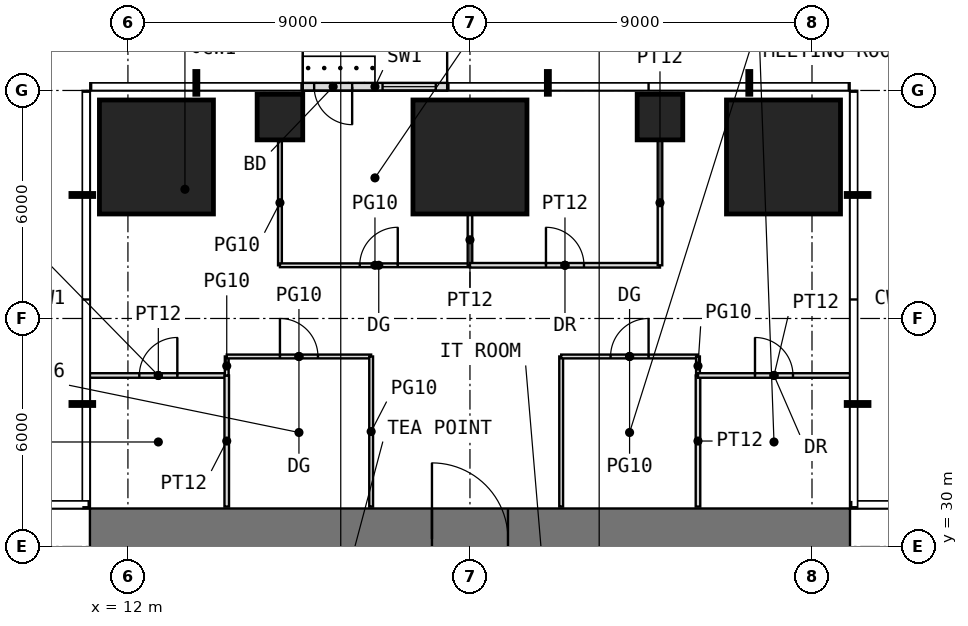
"""IFC4 building model, lengths in metres.
Left out: names, types, materials, properties, quantities, classifications, styles, units other than length and angle.
Written with IfcOpenShell. Run it as: python <this file> out.ifc"""

import sys

from ifc_helpers import new_model, si_unit, direction, frame, frame_2d, origin, origin_2d, place, context, subcontext, project, spatial, rectangle, extrude, element, fill, save


model = new_model("IFC4")
c1 = context("Model", 3, precision=1e-05, world=origin(), true_north=direction((0.0, 1.0)))
c2 = subcontext(c1, "Body", "Model", "MODEL_VIEW")
j1 = project(units=[si_unit("LENGTHUNIT", "METRE"), si_unit("PLANEANGLEUNIT", "RADIAN")], contexts=[c1])
p1 = place(None, origin())
s1 = spatial("IfcSite", under=j1, at=p1, CompositionType="ELEMENT")
p2 = place(p1, origin())
s2 = spatial("IfcBuilding", under=s1, at=p2, CompositionType="ELEMENT")
p3 = place(p2, frame((0.0, 0.0, 108.5)))
s3 = spatial("IfcBuildingStorey", under=s2, at=p3, CompositionType="ELEMENT", Elevation=108.5)
p4 = place(p3, frame((12.75, 40.25, 0.0), z_axis=(0.0, 0.0, 1.0), x_axis=(1.0, 0.0, 0.0)))
e1 = element("IfcColumn", 1, at=p4, inside=s3, PredefinedType="COLUMN", context=c2, shape_type="SweptSolid", body=[
    extrude(rectangle(XDim=3.0, YDim=3.0, at=origin_2d()), origin(), (0.0, 0.0, 1.0), 4.0),
])
p5 = place(p3, frame((16.0, 41.3, 0.0), z_axis=(0.0, 0.0, 1.0), x_axis=(1.0, 0.0, 0.0)))
e2 = element("IfcColumn", 2, at=p5, inside=s3, PredefinedType="COLUMN", context=c2, shape_type="SweptSolid", body=[
    extrude(rectangle(XDim=1.2, YDim=1.2, at=origin_2d()), origin(), (0.0, 0.0, 1.0), 4.0),
])
p6 = place(p3, frame((21.0, 40.25, 0.0), z_axis=(0.0, 0.0, 1.0), x_axis=(1.0, 0.0, 0.0)))
e3 = element("IfcColumn", 3, at=p6, inside=s3, PredefinedType="COLUMN", context=c2, shape_type="SweptSolid", body=[
    extrude(rectangle(XDim=3.0, YDim=3.0, at=origin_2d()), origin(), (0.0, 0.0, 1.0), 4.0),
])
p7 = place(p3, frame((26.0, 41.3, 0.0), z_axis=(0.0, 0.0, 1.0), x_axis=(1.0, 0.0, 0.0)))
e4 = element("IfcColumn", 4, at=p7, inside=s3, PredefinedType="COLUMN", context=c2, shape_type="SweptSolid", body=[
    extrude(rectangle(XDim=1.2, YDim=1.2, at=origin_2d()), origin(), (0.0, 0.0, 1.0), 4.0),
])
p8 = place(p3, frame((29.25, 40.25, 0.0), z_axis=(0.0, 0.0, 1.0), x_axis=(1.0, 0.0, 0.0)))
e5 = element("IfcColumn", 5, at=p8, inside=s3, PredefinedType="COLUMN", context=c2, shape_type="SweptSolid", body=[
    extrude(rectangle(XDim=3.0, YDim=3.0, at=origin_2d()), origin(), (0.0, 0.0, 1.0), 4.0),
])
p9 = place(p3, frame((20.4, 42.1, 0.0), z_axis=(0.0, 0.0, 1.0), x_axis=(-1.0, 0.0, 0.0)))
e6 = element("IfcWall", 6, at=p9, inside=s3, PredefinedType="USERDEFINED", context=c2, shape_type="SweptSolid", body=[
    extrude(rectangle(XDim=3.8, YDim=0.2, at=frame_2d((1.9, 0.0))), origin(), (0.0, 0.0, 1.0), 3.75),
])
p10 = place(p9, frame((2.5, 0.0, 0.0)))
e7 = element("IfcOpeningElement", 7, at=p10, cuts=e6, PredefinedType="OPENING", context=c2, shape_type="SweptSolid", body=[
    extrude(rectangle(XDim=1.0, YDim=2.4, at=frame_2d((0.5, 1.2))), frame((0.0, 0.11, 0.0), z_axis=(0.0, -1.0, 0.0), x_axis=(1.0, 0.0, 0.0)), (0.0, 0.0, 1.0), 0.22),
])
p11 = place(p9, frame((0.3, 0.0, 0.3)))
e8 = element("IfcOpeningElement", 8, at=p11, cuts=e6, PredefinedType="OPENING", context=c2, shape_type="SweptSolid", body=[
    extrude(rectangle(XDim=1.4, YDim=2.7, at=frame_2d((0.7, 1.35))), frame((0.0, 0.11, 0.0), z_axis=(0.0, -1.0, 0.0), x_axis=(1.0, 0.0, 0.0)), (0.0, 0.0, 1.0), 0.22),
])
p12 = place(p3, frame((11.0, 30.2, -0.05), z_axis=(0.0, 0.0, 1.0), x_axis=(1.0, 0.0, 0.0)))
e9 = element("IfcWall", 9, at=p12, inside=s3, PredefinedType="SHEAR", context=c2, shape_type="SweptSolid", body=[
    extrude(rectangle(XDim=20.0, YDim=1.6, at=frame_2d((10.0, 0.0))), origin(), (0.0, 0.0, 1.0), 4.0),
])
p13 = place(p12, frame((9.0, 0.0, 0.05)))
e10 = element("IfcOpeningElement", 10, at=p13, cuts=e9, PredefinedType="OPENING", context=c2, shape_type="SweptSolid", body=[
    extrude(rectangle(XDim=2.0, YDim=2.2, at=frame_2d((1.0, 1.1))), frame((0.0, 0.81, 0.0), z_axis=(0.0, -1.0, 0.0), x_axis=(1.0, 0.0, 0.0)), (0.0, 0.0, 1.0), 1.62),
])
p14 = place(p3, frame((11.0, 34.5, 0.0), z_axis=(0.0, 0.0, 1.0), x_axis=(1.0, 0.0, 0.0)))
e11 = element("IfcWall", 11, at=p14, inside=s3, PredefinedType="PARTITIONING", context=c2, shape_type="SweptSolid", body=[
    extrude(rectangle(XDim=3.6, YDim=0.12, at=frame_2d((1.8, 0.0))), origin(), (0.0, 0.0, 1.0), 3.75),
])
p15 = place(p14, frame((1.3, 0.0, 0.0)))
e12 = element("IfcOpeningElement", 12, at=p15, cuts=e11, PredefinedType="OPENING", context=c2, shape_type="SweptSolid", body=[
    extrude(rectangle(XDim=1.0, YDim=2.2, at=frame_2d((0.5, 1.1))), frame((0.0, 0.07, 0.0), z_axis=(0.0, -1.0, 0.0), x_axis=(1.0, 0.0, 0.0)), (0.0, 0.0, 1.0), 0.14),
])
p16 = place(p3, frame((14.6, 31.05, 0.0), z_axis=(0.0, 0.0, 1.0), x_axis=(0.0, 1.0, 0.0)))
e13 = element("IfcWall", 13, at=p16, inside=s3, PredefinedType="PARTITIONING", context=c2, shape_type="SweptSolid", body=[
    extrude(rectangle(XDim=3.45, YDim=0.12, at=frame_2d((1.725, 0.0))), origin(), (0.0, 0.0, 1.0), 3.75),
])
p17 = place(p3, frame((14.6, 34.5, 0.0), z_axis=(0.0, 0.0, 1.0), x_axis=(0.0, 1.0, 0.0)))
e14 = element("IfcWall", 14, at=p17, inside=s3, PredefinedType="PARTITIONING", context=c2, shape_type="SweptSolid", body=[
    extrude(rectangle(XDim=0.5, YDim=0.1, at=frame_2d((0.25, 0.0))), origin(), (0.0, 0.0, 1.0), 3.75),
])
p18 = place(p3, frame((14.6, 35.0, 0.0), z_axis=(0.0, 0.0, 1.0), x_axis=(1.0, 0.0, 0.0)))
e15 = element("IfcWall", 15, at=p18, inside=s3, PredefinedType="PARTITIONING", context=c2, shape_type="SweptSolid", body=[
    extrude(rectangle(XDim=3.8, YDim=0.1, at=frame_2d((1.9, 0.0))), origin(), (0.0, 0.0, 1.0), 3.75),
])
p19 = place(p18, frame((1.4, 0.0, 0.0)))
e16 = element("IfcOpeningElement", 16, at=p19, cuts=e15, PredefinedType="OPENING", context=c2, shape_type="SweptSolid", body=[
    extrude(rectangle(XDim=1.0, YDim=2.4, at=frame_2d((0.5, 1.2))), frame((0.0, 0.06, 0.0), z_axis=(0.0, -1.0, 0.0), x_axis=(1.0, 0.0, 0.0)), (0.0, 0.0, 1.0), 0.12),
])
p20 = place(p3, frame((16.0, 37.4, 0.0), z_axis=(0.0, 0.0, 1.0), x_axis=(0.0, 1.0, 0.0)))
e17 = element("IfcWall", 17, at=p20, inside=s3, PredefinedType="PARTITIONING", context=c2, shape_type="SweptSolid", body=[
    extrude(rectangle(XDim=3.29, YDim=0.1, at=frame_2d((1.645, 0.0))), origin(), (0.0, 0.0, 1.0), 3.75),
])
p21 = place(p3, frame((16.0, 37.4, 0.0), z_axis=(0.0, 0.0, 1.0), x_axis=(1.0, 0.0, 0.0)))
e18 = element("IfcWall", 18, at=p21, inside=s3, PredefinedType="PARTITIONING", context=c2, shape_type="SweptSolid", body=[
    extrude(rectangle(XDim=5.0, YDim=0.1, at=frame_2d((2.5, 0.0))), origin(), (0.0, 0.0, 1.0), 3.75),
])
p22 = place(p21, frame((2.1, 0.0, 0.0)))
e19 = element("IfcOpeningElement", 19, at=p22, cuts=e18, PredefinedType="OPENING", context=c2, shape_type="SweptSolid", body=[
    extrude(rectangle(XDim=1.0, YDim=2.4, at=frame_2d((0.5, 1.2))), frame((0.0, 0.06, 0.0), z_axis=(0.0, -1.0, 0.0), x_axis=(1.0, 0.0, 0.0)), (0.0, 0.0, 1.0), 0.12),
])
p23 = place(p3, frame((18.4, 31.05, 0.0), z_axis=(0.0, 0.0, 1.0), x_axis=(0.0, 1.0, 0.0)))
e20 = element("IfcWall", 20, at=p23, inside=s3, PredefinedType="PARTITIONING", context=c2, shape_type="SweptSolid", body=[
    extrude(rectangle(XDim=3.95, YDim=0.1, at=frame_2d((1.975, 0.0))), origin(), (0.0, 0.0, 1.0), 3.75),
])
p24 = place(p3, frame((21.0, 37.4, 0.0), z_axis=(0.0, 0.0, 1.0), x_axis=(0.0, 1.0, 0.0)))
e21 = element("IfcWall", 21, at=p24, inside=s3, PredefinedType="PARTITIONING", context=c2, shape_type="SweptSolid", body=[
    extrude(rectangle(XDim=1.34, YDim=0.12, at=frame_2d((0.67, 0.0))), origin(), (0.0, 0.0, 1.0), 3.75),
])
p25 = place(p3, frame((21.0, 37.4, 0.0), z_axis=(0.0, 0.0, 1.0), x_axis=(1.0, 0.0, 0.0)))
e22 = element("IfcWall", 22, at=p25, inside=s3, PredefinedType="PARTITIONING", context=c2, shape_type="SweptSolid", body=[
    extrude(rectangle(XDim=5.0, YDim=0.12, at=frame_2d((2.5, 0.0))), origin(), (0.0, 0.0, 1.0), 3.75),
])
p26 = place(p25, frame((2.0, 0.0, 0.0)))
e23 = element("IfcOpeningElement", 23, at=p26, cuts=e22, PredefinedType="OPENING", context=c2, shape_type="SweptSolid", body=[
    extrude(rectangle(XDim=1.0, YDim=2.2, at=frame_2d((0.5, 1.1))), frame((0.0, 0.07, 0.0), z_axis=(0.0, -1.0, 0.0), x_axis=(1.0, 0.0, 0.0)), (0.0, 0.0, 1.0), 0.14),
])
p27 = place(p3, frame((23.4, 31.05, 0.0), z_axis=(0.0, 0.0, 1.0), x_axis=(0.0, 1.0, 0.0)))
e24 = element("IfcWall", 24, at=p27, inside=s3, PredefinedType="PARTITIONING", context=c2, shape_type="SweptSolid", body=[
    extrude(rectangle(XDim=3.95, YDim=0.1, at=frame_2d((1.975, 0.0))), origin(), (0.0, 0.0, 1.0), 3.75),
])
p28 = place(p3, frame((23.4, 35.0, 0.0), z_axis=(0.0, 0.0, 1.0), x_axis=(1.0, 0.0, 0.0)))
e25 = element("IfcWall", 25, at=p28, inside=s3, PredefinedType="PARTITIONING", context=c2, shape_type="SweptSolid", body=[
    extrude(rectangle(XDim=3.6, YDim=0.1, at=frame_2d((1.8, 0.0))), origin(), (0.0, 0.0, 1.0), 3.75),
])
p29 = place(p28, frame((1.3, 0.0, 0.0)))
e26 = element("IfcOpeningElement", 26, at=p29, cuts=e25, PredefinedType="OPENING", context=c2, shape_type="SweptSolid", body=[
    extrude(rectangle(XDim=1.0, YDim=2.4, at=frame_2d((0.5, 1.2))), frame((0.0, 0.06, 0.0), z_axis=(0.0, -1.0, 0.0), x_axis=(1.0, 0.0, 0.0)), (0.0, 0.0, 1.0), 0.12),
])
p30 = place(p3, frame((26.0, 37.4, 0.0), z_axis=(0.0, 0.0, 1.0), x_axis=(0.0, 1.0, 0.0)))
e27 = element("IfcWall", 27, at=p30, inside=s3, PredefinedType="PARTITIONING", context=c2, shape_type="SweptSolid", body=[
    extrude(rectangle(XDim=3.29, YDim=0.12, at=frame_2d((1.645, 0.0))), origin(), (0.0, 0.0, 1.0), 3.75),
])
p31 = place(p3, frame((27.0, 31.05, 0.0), z_axis=(0.0, 0.0, 1.0), x_axis=(0.0, 1.0, 0.0)))
e28 = element("IfcWall", 28, at=p31, inside=s3, PredefinedType="PARTITIONING", context=c2, shape_type="SweptSolid", body=[
    extrude(rectangle(XDim=3.45, YDim=0.12, at=frame_2d((1.725, 0.0))), origin(), (0.0, 0.0, 1.0), 3.75),
])
p32 = place(p3, frame((27.0, 34.5, 0.0), z_axis=(0.0, 0.0, 1.0), x_axis=(0.0, 1.0, 0.0)))
e29 = element("IfcWall", 29, at=p32, inside=s3, PredefinedType="PARTITIONING", context=c2, shape_type="SweptSolid", body=[
    extrude(rectangle(XDim=0.5, YDim=0.1, at=frame_2d((0.25, 0.0))), origin(), (0.0, 0.0, 1.0), 3.75),
])
p33 = place(p3, frame((27.0, 34.5, 0.0), z_axis=(0.0, 0.0, 1.0), x_axis=(1.0, 0.0, 0.0)))
e30 = element("IfcWall", 30, at=p33, inside=s3, PredefinedType="PARTITIONING", context=c2, shape_type="SweptSolid", body=[
    extrude(rectangle(XDim=4.0, YDim=0.12, at=frame_2d((2.0, 0.0))), origin(), (0.0, 0.0, 1.0), 3.75),
])
p34 = place(p33, frame((1.5, 0.0, 0.0)))
e31 = element("IfcOpeningElement", 31, at=p34, cuts=e30, PredefinedType="OPENING", context=c2, shape_type="SweptSolid", body=[
    extrude(rectangle(XDim=1.0, YDim=2.2, at=frame_2d((0.5, 1.1))), frame((0.0, 0.07, 0.0), z_axis=(0.0, -1.0, 0.0), x_axis=(1.0, 0.0, 0.0)), (0.0, 0.0, 1.0), 0.14),
])
p35 = place(p10, origin())
e32 = element("IfcDoor", 32, at=p35, inside=s3, OperationType="SINGLE_SWING_LEFT", PredefinedType="DOOR", context=c2, shape_type="SweptSolid", body=[
    extrude(rectangle(XDim=1.0, YDim=2.4, at=frame_2d((0.5, 1.2))), frame((0.0, 0.025, 0.0), z_axis=(0.0, -1.0, 0.0), x_axis=(1.0, 0.0, 0.0)), (0.0, 0.0, 1.0), 0.05),
])
fill(e7, e32)
p36 = place(p11, origin())
e33 = element("IfcWindow", 33, at=p36, inside=s3, PartitioningType="SINGLE_PANEL", PredefinedType="WINDOW", context=c2, shape_type="SweptSolid", body=[
    extrude(rectangle(XDim=1.4, YDim=2.7, at=frame_2d((0.7, 1.35))), frame((0.0, 0.03, 0.0), z_axis=(0.0, -1.0, 0.0), x_axis=(1.0, 0.0, 0.0)), (0.0, 0.0, 1.0), 0.06),
])
fill(e8, e33)
p37 = place(p13, origin())
e34 = element("IfcDoor", 34, at=p37, inside=s3, OperationType="DOUBLE_DOOR_SINGLE_SWING", PredefinedType="DOOR", context=c2, shape_type="SweptSolid", body=[
    extrude(rectangle(XDim=2.0, YDim=2.2, at=frame_2d((1.0, 1.1))), frame((0.0, 0.025, 0.0), z_axis=(0.0, -1.0, 0.0), x_axis=(1.0, 0.0, 0.0)), (0.0, 0.0, 1.0), 0.05),
])
fill(e10, e34)
p38 = place(p15, origin())
e35 = element("IfcDoor", 35, at=p38, inside=s3, OperationType="SINGLE_SWING_RIGHT", PredefinedType="DOOR", context=c2, shape_type="SweptSolid", body=[
    extrude(rectangle(XDim=1.0, YDim=2.2, at=frame_2d((0.5, 1.1))), frame((0.0, 0.025, 0.0), z_axis=(0.0, -1.0, 0.0), x_axis=(1.0, 0.0, 0.0)), (0.0, 0.0, 1.0), 0.05),
])
fill(e12, e35)
p39 = place(p19, origin())
e36 = element("IfcDoor", 36, at=p39, inside=s3, OperationType="SINGLE_SWING_LEFT", PredefinedType="DOOR", context=c2, shape_type="SweptSolid", body=[
    extrude(rectangle(XDim=1.0, YDim=2.4, at=frame_2d((0.5, 1.2))), frame((0.0, 0.025, 0.0), z_axis=(0.0, -1.0, 0.0), x_axis=(1.0, 0.0, 0.0)), (0.0, 0.0, 1.0), 0.05),
])
fill(e16, e36)
p40 = place(p29, origin())
e37 = element("IfcDoor", 37, at=p40, inside=s3, OperationType="SINGLE_SWING_RIGHT", PredefinedType="DOOR", context=c2, shape_type="SweptSolid", body=[
    extrude(rectangle(XDim=1.0, YDim=2.4, at=frame_2d((0.5, 1.2))), frame((0.0, 0.025, 0.0), z_axis=(0.0, -1.0, 0.0), x_axis=(1.0, 0.0, 0.0)), (0.0, 0.0, 1.0), 0.05),
])
fill(e26, e37)
p41 = place(p34, origin())
e38 = element("IfcDoor", 38, at=p41, inside=s3, OperationType="SINGLE_SWING_LEFT", PredefinedType="DOOR", context=c2, shape_type="SweptSolid", body=[
    extrude(rectangle(XDim=1.0, YDim=2.2, at=frame_2d((0.5, 1.1))), frame((0.0, 0.025, 0.0), z_axis=(0.0, -1.0, 0.0), x_axis=(1.0, 0.0, 0.0)), (0.0, 0.0, 1.0), 0.05),
])
fill(e31, e38)
p42 = place(p22, origin())
e39 = element("IfcDoor", 39, at=p42, inside=s3, OperationType="SINGLE_SWING_RIGHT", PredefinedType="DOOR", context=c2, shape_type="SweptSolid", body=[
    extrude(rectangle(XDim=1.0, YDim=2.4, at=frame_2d((0.5, 1.2))), frame((0.0, 0.025, 0.0), z_axis=(0.0, -1.0, 0.0), x_axis=(1.0, 0.0, 0.0)), (0.0, 0.0, 1.0), 0.05),
])
fill(e19, e39)
p43 = place(p26, origin())
e40 = element("IfcDoor", 40, at=p43, inside=s3, OperationType="SINGLE_SWING_LEFT", PredefinedType="DOOR", context=c2, shape_type="SweptSolid", body=[
    extrude(rectangle(XDim=1.0, YDim=2.2, at=frame_2d((0.5, 1.1))), frame((0.0, 0.025, 0.0), z_axis=(0.0, -1.0, 0.0), x_axis=(1.0, 0.0, 0.0)), (0.0, 0.0, 1.0), 0.05),
])
fill(e23, e40)
save(model, sys.argv[1])
